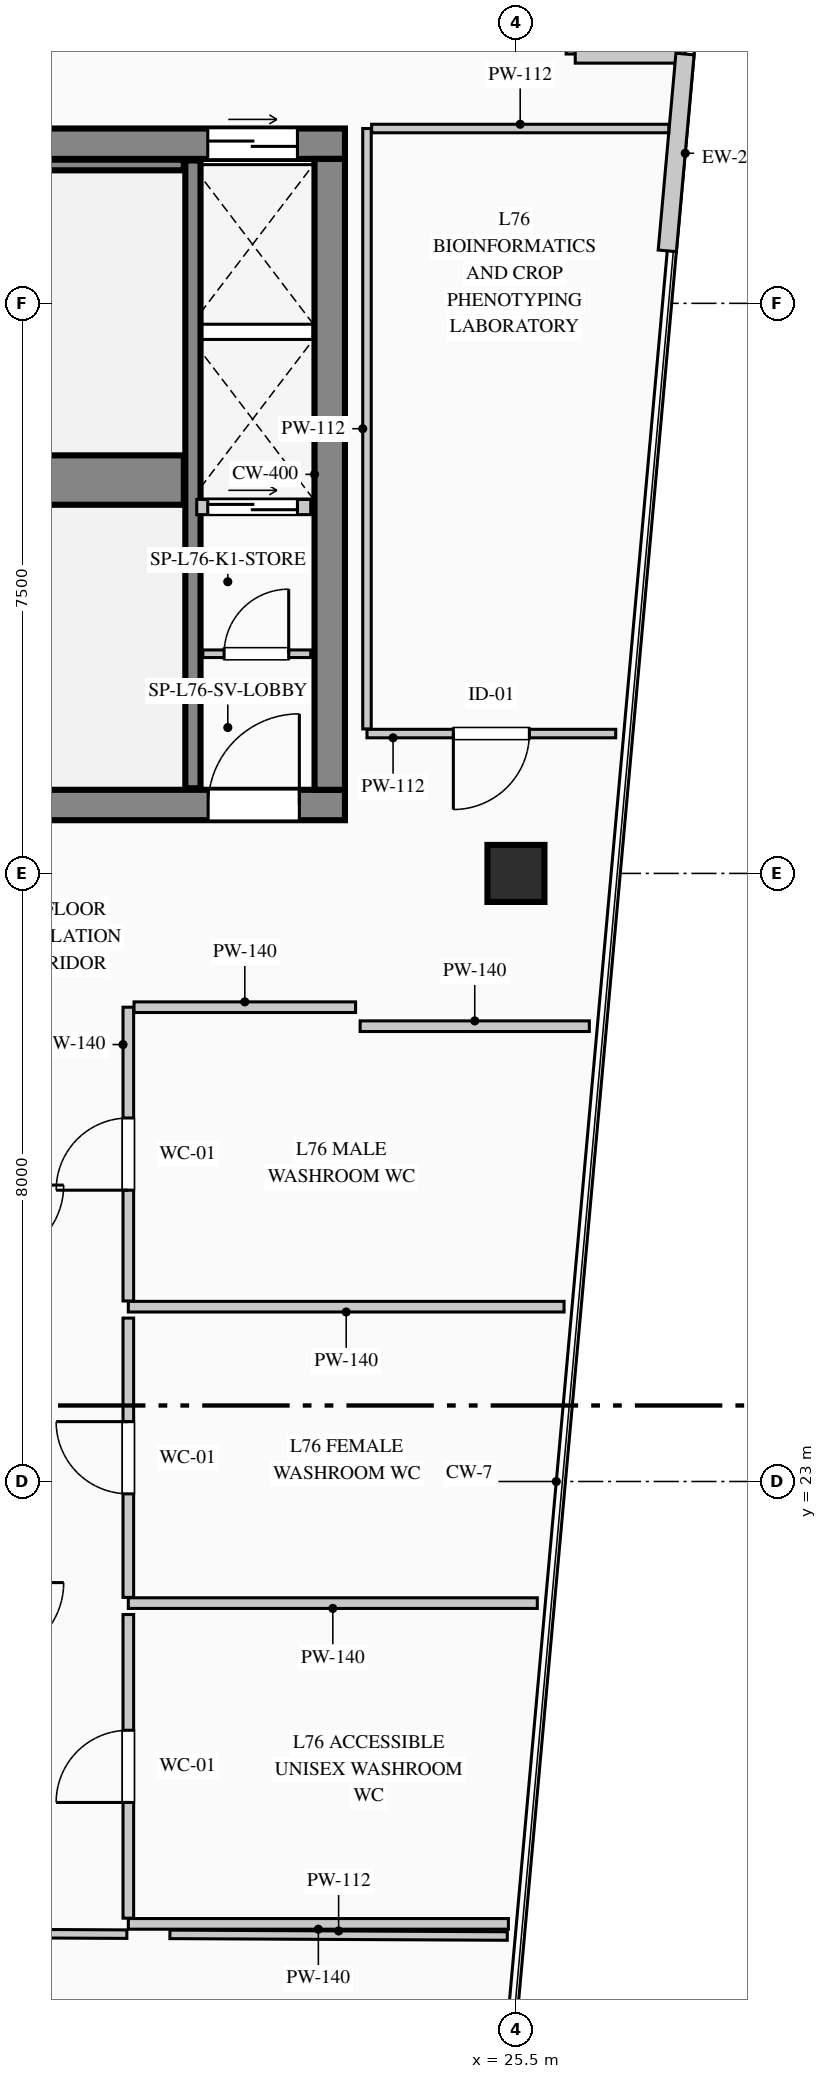
"""IFC4 building model, lengths in metres.
Left out: names, types, materials, properties, quantities, classifications, styles, units other than length and angle.
Written with IfcOpenShell. Run it as: python <this file> out.ifc"""

import sys

from ifc_helpers import new_model, si_unit, direction, frame, frame_2d, origin, origin_2d, place, context, subcontext, project, spatial, rectangle, extrude, element, fill, save


model = new_model("IFC4")
c1 = context("Model", 3, precision=1e-05, world=origin(), true_north=direction((0.0, 1.0)))
c2 = subcontext(c1, "Body", "Model", "MODEL_VIEW")
j1 = project(units=[si_unit("LENGTHUNIT", "METRE"), si_unit("PLANEANGLEUNIT", "RADIAN")], contexts=[c1])
p1 = place(None, origin())
s1 = spatial("IfcSite", under=j1, at=p1, CompositionType="ELEMENT")
p2 = place(p1, origin())
s2 = spatial("IfcBuilding", under=s1, at=p2, CompositionType="ELEMENT")
p3 = place(p2, frame((0.0, 0.0, 315.95)))
s3 = spatial("IfcBuildingStorey", under=s2, at=p3, CompositionType="ELEMENT", Elevation=315.95)
p4 = place(p3, frame((5.6, 40.6, 0.0), z_axis=(0.0, 0.0, 1.0), x_axis=(1.0, 0.0, 0.0)))
e1 = element("IfcWall", 1, at=p4, inside=s3, PredefinedType="SHEAR", context=c2, shape_type="SweptSolid", body=[
    extrude(rectangle(XDim=17.65, YDim=0.4, at=frame_2d((8.825, 0.0))), origin(), (0.0, 0.0, 1.0), 3.95),
])
p5 = place(p4, frame((15.845, 0.0, 0.0)))
e2 = element("IfcOpeningElement", 2, at=p5, cuts=e1, PredefinedType="OPENING", context=c2, shape_type="SweptSolid", body=[
    extrude(rectangle(XDim=1.18, YDim=2.25, at=frame_2d((0.59, 1.125))), frame((0.0, 0.21, 0.0), z_axis=(0.0, -1.0, 0.0), x_axis=(1.0, 0.0, 0.0)), (0.0, 0.0, 1.0), 0.42),
])
p6 = place(p3, frame((5.6, 31.9, 0.0), z_axis=(0.0, 0.0, 1.0), x_axis=(1.0, 0.0, 0.0)))
e3 = element("IfcWall", 3, at=p6, inside=s3, PredefinedType="SHEAR", context=c2, shape_type="SweptSolid", body=[
    extrude(rectangle(XDim=17.65, YDim=0.4, at=frame_2d((8.825, 0.0))), origin(), (0.0, 0.0, 1.0), 3.95),
])
p7 = place(p6, frame((3.05, 0.0, 0.0)))
e4 = element("IfcOpeningElement", 4, at=p7, cuts=e3, PredefinedType="OPENING", context=c2, shape_type="SweptSolid", body=[
    extrude(rectangle(XDim=1.2, YDim=2.2, at=frame_2d((0.6, 1.1))), frame((0.0, 0.21, 0.0), z_axis=(0.0, -1.0, 0.0), x_axis=(1.0, 0.0, 0.0)), (0.0, 0.0, 1.0), 0.42),
])
p8 = place(p6, frame((6.9, 0.0, 0.0)))
e5 = element("IfcOpeningElement", 5, at=p8, cuts=e3, PredefinedType="OPENING", context=c2, shape_type="SweptSolid", body=[
    extrude(rectangle(XDim=1.2, YDim=2.2, at=frame_2d((0.6, 1.1))), frame((0.0, 0.21, 0.0), z_axis=(0.0, -1.0, 0.0), x_axis=(1.0, 0.0, 0.0)), (0.0, 0.0, 1.0), 0.42),
])
p9 = place(p6, frame((8.75, 0.0, 0.0)))
e6 = element("IfcOpeningElement", 6, at=p9, cuts=e3, PredefinedType="OPENING", context=c2, shape_type="SweptSolid", body=[
    extrude(rectangle(XDim=1.15, YDim=2.2, at=frame_2d((0.575, 1.1))), frame((0.0, 0.21, 0.0), z_axis=(0.0, -1.0, 0.0), x_axis=(1.0, 0.0, 0.0)), (0.0, 0.0, 1.0), 0.42),
])
p10 = place(p6, frame((15.85, 0.0, 0.0)))
e7 = element("IfcOpeningElement", 7, at=p10, cuts=e3, PredefinedType="OPENING", context=c2, shape_type="SweptSolid", body=[
    extrude(rectangle(XDim=1.2, YDim=2.2, at=frame_2d((0.6, 1.1))), frame((0.0, 0.21, 0.0), z_axis=(0.0, -1.0, 0.0), x_axis=(1.0, 0.0, 0.0)), (0.0, 0.0, 1.0), 0.42),
])
p11 = place(p3, frame((23.05, 32.1, 0.0), z_axis=(0.0, 0.0, 1.0), x_axis=(0.0, 1.0, 0.0)))
e8 = element("IfcWall", 8, at=p11, inside=s3, PredefinedType="SHEAR", context=c2, shape_type="SweptSolid", body=[
    extrude(rectangle(XDim=8.3, YDim=0.4, at=frame_2d((4.15, 0.0))), origin(), (0.0, 0.0, 1.0), 3.95),
])
p12 = place(p3, frame((14.12, 36.175, 0.0), z_axis=(0.0, 0.0, 1.0), x_axis=(1.0, 0.0, 0.0)))
e9 = element("IfcWall", 9, at=p12, inside=s3, PredefinedType="SHEAR", context=c2, shape_type="SweptSolid", body=[
    extrude(rectangle(XDim=7.01, YDim=0.65, at=frame_2d((3.505, 0.0))), origin(), (0.0, 0.0, 1.0), 3.95),
])
p13 = place(p3, frame((21.25, 32.12, 0.0), z_axis=(0.0, 0.0, 1.0), x_axis=(0.0, 1.0, 0.0)))
e10 = element("IfcWall", 10, at=p13, inside=s3, PredefinedType="SHEAR", context=c2, shape_type="SweptSolid", body=[
    extrude(rectangle(XDim=8.26, YDim=0.2, at=frame_2d((4.13, 0.0))), origin(), (0.0, 0.0, 1.0), 3.95),
])
p14 = place(p3, frame((14.12, 40.32, 0.0), z_axis=(0.0, 0.0, 1.0), x_axis=(1.0, 0.0, 0.0)))
e11 = element("IfcWall", 11, at=p14, inside=s3, PredefinedType="SHEAR", context=c2, shape_type="SweptSolid", body=[
    extrude(rectangle(XDim=7.01, YDim=0.14, at=frame_2d((3.505, 0.0))), origin(), (0.0, 0.0, 1.0), 3.95),
])
p15 = place(p3, frame((25.5, 31.0, 0.0), z_axis=(0.0, 0.0, 1.0), x_axis=(1.0, 0.0, 0.0)))
e12 = element("IfcColumn", 12, at=p15, inside=s3, PredefinedType="COLUMN", context=c2, shape_type="SweptSolid", body=[
    extrude(rectangle(XDim=0.75, YDim=0.75, at=origin_2d()), origin(), (0.0, 0.0, 1.0), 3.95),
])
p16 = place(p3, frame((26.28, 43.38, 0.0), z_axis=(0.0, 0.0, 1.0), x_axis=(0.0, -1.0, 0.0)))
e13 = element("IfcWall", 13, at=p16, inside=s3, PredefinedType="STANDARD", context=c2, shape_type="SweptSolid", body=[
    extrude(rectangle(XDim=1.6, YDim=0.24, at=frame_2d((0.8, 0.0))), origin(), (0.0, 0.0, 1.0), 3.7),
])
p17 = place(p3, frame((26.28, 41.78, 0.0), z_axis=(0.0, 0.0, 1.0), x_axis=(1.0, 0.0, 0.0)))
e14 = element("IfcWall", 14, at=p17, inside=s3, PredefinedType="STANDARD", context=c2, shape_type="SweptSolid", body=[
    extrude(rectangle(XDim=1.444, YDim=0.24, at=frame_2d((0.722, 0.0))), origin(), (0.0, 0.0, 1.0), 3.7),
])
p18 = place(p3, frame((27.724, 41.78, 0.0), z_axis=(0.0, 0.0, 1.0), x_axis=(-0.089765303723, -0.995962946222, 0.0)))
e15 = element("IfcWall", 15, at=p18, inside=s3, PredefinedType="STANDARD", context=c2, shape_type="SweptSolid", body=[
    extrude(rectangle(XDim=2.6, YDim=0.24, at=frame_2d((1.3, 0.0))), origin(), (0.0, 0.0, 1.0), 3.7),
])
p19 = place(p3, frame((21.38, 33.89, 0.0), z_axis=(0.0, 0.0, 1.0), x_axis=(1.0, 0.0, 0.0)))
e16 = element("IfcWall", 16, at=p19, inside=s3, PredefinedType="PARTITIONING", context=c2, shape_type="SweptSolid", body=[
    extrude(rectangle(XDim=1.42, YDim=0.1, at=frame_2d((0.71, 0.0))), origin(), (0.0, 0.0, 1.0), 3.7),
])
p20 = place(p19, frame((0.28, 0.0, 0.0)))
e17 = element("IfcOpeningElement", 17, at=p20, cuts=e16, PredefinedType="OPENING", context=c2, shape_type="SweptSolid", body=[
    extrude(rectangle(XDim=0.85, YDim=2.1, at=frame_2d((0.425, 1.05))), frame((0.0, 0.06, 0.0), z_axis=(0.0, -1.0, 0.0), x_axis=(1.0, 0.0, 0.0)), (0.0, 0.0, 1.0), 0.12),
])
p21 = place(p3, frame((21.3, 35.82, 0.0), z_axis=(0.0, 0.0, 1.0), x_axis=(1.0, 0.0, 0.0)))
e18 = element("IfcWall", 18, at=p21, inside=s3, PredefinedType="PARTITIONING", context=c2, shape_type="SweptSolid", body=[
    extrude(rectangle(XDim=1.5, YDim=0.2, at=frame_2d((0.75, 0.0))), origin(), (0.0, 0.0, 1.0), 3.7),
])
p22 = place(p21, frame((0.145, 0.0, 0.0)))
e19 = element("IfcOpeningElement", 19, at=p22, cuts=e18, PredefinedType="OPENING", context=c2, shape_type="SweptSolid", body=[
    extrude(rectangle(XDim=1.18, YDim=2.25, at=frame_2d((0.59, 1.125))), frame((0.0, 0.11, 0.0), z_axis=(0.0, -1.0, 0.0), x_axis=(1.0, 0.0, 0.0)), (0.0, 0.0, 1.0), 0.22),
])
p23 = place(p3, frame((26.813, 32.84, 0.0), z_axis=(0.0, 0.0, 1.0), x_axis=(-1.0, 0.0, 0.0)))
e20 = element("IfcWall", 20, at=p23, inside=s3, PredefinedType="PARTITIONING", context=c2, shape_type="SweptSolid", body=[
    extrude(rectangle(XDim=3.273, YDim=0.112, at=frame_2d((1.636, 0.0))), origin(), (0.0, 0.0, 1.0), 3.7),
])
p24 = place(p23, frame((1.136, 0.0, 0.0)))
e21 = element("IfcOpeningElement", 21, at=p24, cuts=e20, PredefinedType="OPENING", context=c2, shape_type="SweptSolid", body=[
    extrude(rectangle(XDim=1.0, YDim=2.15, at=frame_2d((0.5, 1.075))), frame((0.0, 0.066, 0.0), z_axis=(0.0, -1.0, 0.0), x_axis=(1.0, 0.0, 0.0)), (0.0, 0.0, 1.0), 0.132),
])
p25 = place(p3, frame((23.54, 32.901, 0.0), z_axis=(0.0, 0.0, 1.0), x_axis=(0.0, 1.0, 0.0)))
e22 = element("IfcWall", 22, at=p25, inside=s3, PredefinedType="PARTITIONING", context=c2, shape_type="SweptSolid", body=[
    extrude(rectangle(XDim=7.899, YDim=0.112, at=frame_2d((3.95, 0.0))), origin(), (0.0, 0.0, 1.0), 3.7),
])
p26 = place(p3, frame((23.601, 40.8, 0.0), z_axis=(0.0, 0.0, 1.0), x_axis=(1.0, 0.0, 0.0)))
e23 = element("IfcWall", 23, at=p26, inside=s3, PredefinedType="PARTITIONING", context=c2, shape_type="SweptSolid", body=[
    extrude(rectangle(XDim=3.909, YDim=0.112, at=frame_2d((1.955, 0.0))), origin(), (0.0, 0.0, 1.0), 3.7),
])
p27 = place(p3, frame((23.45, 28.99, 0.0), z_axis=(0.0, 0.0, 1.0), x_axis=(1.0, 0.0, 0.0)))
e24 = element("IfcWall", 24, at=p27, inside=s3, PredefinedType="PARTITIONING", context=c2, shape_type="SweptSolid", body=[
    extrude(rectangle(XDim=3.016, YDim=0.14, at=frame_2d((1.508, 0.0))), origin(), (0.0, 0.0, 1.0), 3.7),
])
p28 = place(p3, frame((26.133, 25.3, 0.0), z_axis=(0.0, 0.0, 1.0), x_axis=(-1.0, 0.0, 0.0)))
e25 = element("IfcWall", 25, at=p28, inside=s3, PredefinedType="PARTITIONING", context=c2, shape_type="SweptSolid", body=[
    extrude(rectangle(XDim=5.733, YDim=0.14, at=frame_2d((2.866, 0.0))), origin(), (0.0, 0.0, 1.0), 3.7),
])
p29 = place(p3, frame((20.4, 25.375, 0.0), z_axis=(0.0, 0.0, 1.0), x_axis=(0.0, 1.0, 0.0)))
e26 = element("IfcWall", 26, at=p29, inside=s3, PredefinedType="PARTITIONING", context=c2, shape_type="SweptSolid", body=[
    extrude(rectangle(XDim=3.865, YDim=0.14, at=frame_2d((1.933, 0.0))), origin(), (0.0, 0.0, 1.0), 3.7),
])
p30 = place(p29, frame((1.458, 0.0, 0.0)))
e27 = element("IfcOpeningElement", 27, at=p30, cuts=e26, PredefinedType="OPENING", context=c2, shape_type="SweptSolid", body=[
    extrude(rectangle(XDim=0.95, YDim=2.15, at=frame_2d((0.475, 1.075))), frame((0.0, 0.08, 0.0), z_axis=(0.0, -1.0, 0.0), x_axis=(1.0, 0.0, 0.0)), (0.0, 0.0, 1.0), 0.16),
])
p31 = place(p3, frame((20.475, 29.24, 0.0), z_axis=(0.0, 0.0, 1.0), x_axis=(1.0, 0.0, 0.0)))
e28 = element("IfcWall", 28, at=p31, inside=s3, PredefinedType="PARTITIONING", context=c2, shape_type="SweptSolid", body=[
    extrude(rectangle(XDim=2.915, YDim=0.14, at=frame_2d((1.458, 0.0))), origin(), (0.0, 0.0, 1.0), 3.7),
])
p32 = place(p3, frame((25.781, 21.4, 0.0), z_axis=(0.0, 0.0, 1.0), x_axis=(-1.0, 0.0, 0.0)))
e29 = element("IfcWall", 29, at=p32, inside=s3, PredefinedType="PARTITIONING", context=c2, shape_type="SweptSolid", body=[
    extrude(rectangle(XDim=5.381, YDim=0.14, at=frame_2d((2.69, 0.0))), origin(), (0.0, 0.0, 1.0), 3.7),
])
p33 = place(p3, frame((20.4, 21.475, 0.0), z_axis=(0.0, 0.0, 1.0), x_axis=(0.0, 1.0, 0.0)))
e30 = element("IfcWall", 30, at=p33, inside=s3, PredefinedType="PARTITIONING", context=c2, shape_type="SweptSolid", body=[
    extrude(rectangle(XDim=3.675, YDim=0.14, at=frame_2d((1.837, 0.0))), origin(), (0.0, 0.0, 1.0), 3.7),
])
p34 = place(p33, frame((1.363, 0.0, 0.0)))
e31 = element("IfcOpeningElement", 31, at=p34, cuts=e30, PredefinedType="OPENING", context=c2, shape_type="SweptSolid", body=[
    extrude(rectangle(XDim=0.95, YDim=2.15, at=frame_2d((0.475, 1.075))), frame((0.0, 0.08, 0.0), z_axis=(0.0, -1.0, 0.0), x_axis=(1.0, 0.0, 0.0)), (0.0, 0.0, 1.0), 0.16),
])
p35 = place(p3, frame((25.4, 17.18, 0.0), z_axis=(0.0, 0.0, 1.0), x_axis=(-1.0, 0.0, 0.0)))
e32 = element("IfcWall", 32, at=p35, inside=s3, PredefinedType="PARTITIONING", context=c2, shape_type="SweptSolid", body=[
    extrude(rectangle(XDim=5.0, YDim=0.14, at=frame_2d((2.5, 0.0))), origin(), (0.0, 0.0, 1.0), 3.7),
])
p36 = place(p3, frame((20.4, 17.255, 0.0), z_axis=(0.0, 0.0, 1.0), x_axis=(0.0, 1.0, 0.0)))
e33 = element("IfcWall", 33, at=p36, inside=s3, PredefinedType="PARTITIONING", context=c2, shape_type="SweptSolid", body=[
    extrude(rectangle(XDim=3.995, YDim=0.14, at=frame_2d((1.998, 0.0))), origin(), (0.0, 0.0, 1.0), 3.7),
])
p37 = place(p36, frame((1.522, 0.0, 0.0)))
e34 = element("IfcOpeningElement", 34, at=p37, cuts=e33, PredefinedType="OPENING", context=c2, shape_type="SweptSolid", body=[
    extrude(rectangle(XDim=0.95, YDim=2.15, at=frame_2d((0.475, 1.075))), frame((0.0, 0.08, 0.0), z_axis=(0.0, -1.0, 0.0), x_axis=(1.0, 0.0, 0.0)), (0.0, 0.0, 1.0), 0.16),
])
p38 = place(p3, frame((20.947, 17.042, 0.0), z_axis=(0.0, 0.0, 1.0), x_axis=(0.999988019942, -0.004894892409, 0.0)))
e35 = element("IfcWall", 35, at=p38, inside=s3, PredefinedType="PARTITIONING", context=c2, shape_type="SweptSolid", body=[
    extrude(rectangle(XDim=4.439, YDim=0.112, at=frame_2d((2.219, 0.0))), origin(), (0.0, 0.0, 1.0), 3.7),
])
p39 = place(p3, frame((15.24, 17.07, 0.0), z_axis=(0.0, 0.0, 1.0), x_axis=(0.999988036902, -0.0048914265, 0.0)))
e36 = element("IfcWall", 36, at=p39, inside=s3, PredefinedType="PARTITIONING", context=c2, shape_type="SweptSolid", body=[
    extrude(rectangle(XDim=5.141, YDim=0.112, at=frame_2d((2.57, 0.0))), origin(), (0.0, 0.0, 1.0), 3.7),
])
p40 = place(p39, frame((2.071, 0.0, 0.0)))
e37 = element("IfcOpeningElement", 37, at=p40, cuts=e36, PredefinedType="OPENING", context=c2, shape_type="SweptSolid", body=[
    extrude(rectangle(XDim=1.0, YDim=2.15, at=frame_2d((0.5, 1.075))), frame((0.0, 0.066, 0.0), z_axis=(0.0, -1.0, 0.0), x_axis=(1.0, 0.0, 0.0)), (0.0, 0.0, 1.0), 0.132),
])
p41 = place(p10, origin())
e38 = element("IfcDoor", 38, at=p41, inside=s3, OperationType="SINGLE_SWING_RIGHT", PredefinedType="DOOR", context=c2, shape_type="SweptSolid", body=[
    extrude(rectangle(XDim=1.2, YDim=2.2, at=frame_2d((0.6, 1.1))), frame((0.0, 0.025, 0.0), z_axis=(0.0, -1.0, 0.0), x_axis=(1.0, 0.0, 0.0)), (0.0, 0.0, 1.0), 0.05),
])
fill(e7, e38)
p42 = place(p20, origin())
e39 = element("IfcDoor", 39, at=p42, inside=s3, OperationType="SINGLE_SWING_RIGHT", PredefinedType="DOOR", context=c2, shape_type="SweptSolid", body=[
    extrude(rectangle(XDim=0.85, YDim=2.1, at=frame_2d((0.425, 1.05))), frame((0.0, 0.025, 0.0), z_axis=(0.0, -1.0, 0.0), x_axis=(1.0, 0.0, 0.0)), (0.0, 0.0, 1.0), 0.05),
])
fill(e17, e39)
p43 = place(p5, origin())
e40 = element("IfcDoor", 40, at=p43, inside=s3, OperationType="DOUBLE_DOOR_SLIDING", PredefinedType="DOOR", context=c2, shape_type="SweptSolid", body=[
    extrude(rectangle(XDim=1.18, YDim=2.25, at=frame_2d((0.59, 1.125))), frame((0.0, 0.025, 0.0), z_axis=(0.0, -1.0, 0.0), x_axis=(1.0, 0.0, 0.0)), (0.0, 0.0, 1.0), 0.05),
])
fill(e2, e40)
p44 = place(p22, origin())
e41 = element("IfcDoor", 41, at=p44, inside=s3, OperationType="DOUBLE_DOOR_SLIDING", PredefinedType="DOOR", context=c2, shape_type="SweptSolid", body=[
    extrude(rectangle(XDim=1.18, YDim=2.25, at=frame_2d((0.59, 1.125))), frame((0.0, 0.025, 0.0), z_axis=(0.0, -1.0, 0.0), x_axis=(1.0, 0.0, 0.0)), (0.0, 0.0, 1.0), 0.05),
])
fill(e19, e41)
p45 = place(p24, origin())
e42 = element("IfcDoor", 42, at=p45, inside=s3, OperationType="SINGLE_SWING_RIGHT", PredefinedType="DOOR", context=c2, shape_type="SweptSolid", body=[
    extrude(rectangle(XDim=1.0, YDim=2.15, at=frame_2d((0.5, 1.075))), frame((0.0, 0.025, 0.0), z_axis=(0.0, -1.0, 0.0), x_axis=(1.0, 0.0, 0.0)), (0.0, 0.0, 1.0), 0.05),
])
fill(e21, e42)
p46 = place(p30, origin())
e43 = element("IfcDoor", 43, at=p46, inside=s3, OperationType="SINGLE_SWING_LEFT", PredefinedType="DOOR", context=c2, shape_type="SweptSolid", body=[
    extrude(rectangle(XDim=0.95, YDim=2.15, at=frame_2d((0.475, 1.075))), frame((0.0, 0.025, 0.0), z_axis=(0.0, -1.0, 0.0), x_axis=(1.0, 0.0, 0.0)), (0.0, 0.0, 1.0), 0.05),
])
fill(e27, e43)
p47 = place(p34, origin())
e44 = element("IfcDoor", 44, at=p47, inside=s3, OperationType="SINGLE_SWING_RIGHT", PredefinedType="DOOR", context=c2, shape_type="SweptSolid", body=[
    extrude(rectangle(XDim=0.95, YDim=2.15, at=frame_2d((0.475, 1.075))), frame((0.0, 0.025, 0.0), z_axis=(0.0, -1.0, 0.0), x_axis=(1.0, 0.0, 0.0)), (0.0, 0.0, 1.0), 0.05),
])
fill(e31, e44)
p48 = place(p37, origin())
e45 = element("IfcDoor", 45, at=p48, inside=s3, OperationType="SINGLE_SWING_LEFT", PredefinedType="DOOR", context=c2, shape_type="SweptSolid", body=[
    extrude(rectangle(XDim=0.95, YDim=2.15, at=frame_2d((0.475, 1.075))), frame((0.0, 0.025, 0.0), z_axis=(0.0, -1.0, 0.0), x_axis=(1.0, 0.0, 0.0)), (0.0, 0.0, 1.0), 0.05),
])
fill(e34, e45)
save(model, sys.argv[1])
